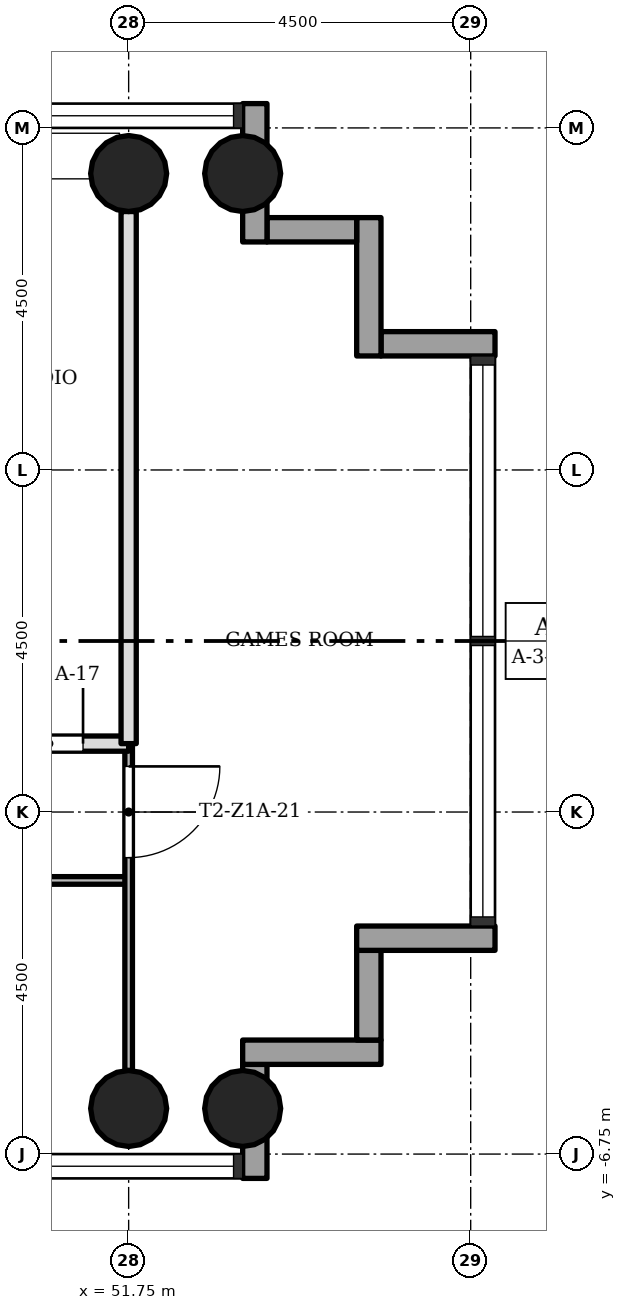
"""IFC4 building model, lengths in metres.
Left out: names, types, materials, properties, quantities, classifications, styles, units other than length and angle.
Written with IfcOpenShell. Run it as: python <this file> out.ifc"""

import sys

from ifc_helpers import new_model, si_unit, direction, frame, frame_2d, origin, origin_2d, place, context, subcontext, project, spatial, rectangle, hollow_circle, extrude, element, fill, save


model = new_model("IFC4")
c1 = context("Model", 3, precision=1e-05, world=origin(), true_north=direction((0.0, 1.0)))
c2 = subcontext(c1, "Body", "Model", "MODEL_VIEW")
j1 = project(units=[si_unit("LENGTHUNIT", "METRE"), si_unit("PLANEANGLEUNIT", "RADIAN")], contexts=[c1])
p1 = place(None, origin())
s1 = spatial("IfcSite", under=j1, at=p1, CompositionType="ELEMENT")
p2 = place(p1, origin())
s2 = spatial("IfcBuilding", under=s1, at=p2, CompositionType="ELEMENT")
p3 = place(p2, frame((0.0, 0.0, 27.9)))
s3 = spatial("IfcBuildingStorey", under=s2, at=p3, CompositionType="ELEMENT", Elevation=27.9)
for number, where, z_axis, x_axis in (
    (1, (51.75, -6.15, 0.0), (0.0, 0.0, 1.0), (1.0, 0.0, 0.0)),
    (2, (51.75, 6.15, 0.0), (0.0, 0.0, 1.0), (1.0, 0.0, 0.0)),
    (3, (53.25, -6.15, 0.0), (0.0, 0.0, 1.0), (1.0, 0.0, 0.0)),
    (4, (53.25, 6.15, 0.0), (0.0, 0.0, 1.0), (1.0, 0.0, 0.0)),
):
    element("IfcColumn", number, at=place(p3, frame(where, z_axis=z_axis, x_axis=x_axis)), inside=s3, PredefinedType="COLUMN", context=c2, shape_type="SweptSolid", body=[
        extrude(hollow_circle(Radius=0.5, WallThickness=0.036, at=origin_2d()), origin(), (0.0, 0.0, 1.0), 3.4),
    ])
p4 = place(p3, frame((53.41, -7.07, -0.3), z_axis=(0.0, 0.0, 1.0), x_axis=(0.0, 1.0, 0.0)))
e5 = element("IfcWall", 5, at=p4, inside=s3, PredefinedType="STANDARD", context=c2, shape_type="SweptSolid", body=[
    extrude(rectangle(XDim=1.5, YDim=0.32, at=frame_2d((0.75, 0.0))), origin(), (0.0, 0.0, 1.0), 3.4),
])
p5 = place(p3, frame((53.25, -5.41, -0.3), z_axis=(0.0, 0.0, 1.0), x_axis=(1.0, 0.0, 0.0)))
e6 = element("IfcWall", 6, at=p5, inside=s3, PredefinedType="STANDARD", context=c2, shape_type="SweptSolid", body=[
    extrude(rectangle(XDim=1.82, YDim=0.32, at=frame_2d((0.91, 0.0))), origin(), (0.0, 0.0, 1.0), 3.4),
])
p6 = place(p3, frame((54.91, -5.25, -0.3), z_axis=(0.0, 0.0, 1.0), x_axis=(0.0, 1.0, 0.0)))
e7 = element("IfcWall", 7, at=p6, inside=s3, PredefinedType="STANDARD", context=c2, shape_type="SweptSolid", body=[
    extrude(rectangle(XDim=1.18, YDim=0.32, at=frame_2d((0.59, 0.0))), origin(), (0.0, 0.0, 1.0), 3.4),
])
p7 = place(p3, frame((54.75, -3.91, -0.3), z_axis=(0.0, 0.0, 1.0), x_axis=(1.0, 0.0, 0.0)))
e8 = element("IfcWall", 8, at=p7, inside=s3, PredefinedType="STANDARD", context=c2, shape_type="SweptSolid", body=[
    extrude(rectangle(XDim=1.82, YDim=0.32, at=frame_2d((0.91, 0.0))), origin(), (0.0, 0.0, 1.0), 3.4),
])
p8 = place(p3, frame((56.57, 3.91, -0.3), z_axis=(0.0, 0.0, 1.0), x_axis=(-1.0, 0.0, 0.0)))
e9 = element("IfcWall", 9, at=p8, inside=s3, PredefinedType="STANDARD", context=c2, shape_type="SweptSolid", body=[
    extrude(rectangle(XDim=1.5, YDim=0.32, at=frame_2d((0.75, 0.0))), origin(), (0.0, 0.0, 1.0), 3.4),
])
p9 = place(p3, frame((54.91, 3.75, -0.3), z_axis=(0.0, 0.0, 1.0), x_axis=(0.0, 1.0, 0.0)))
e10 = element("IfcWall", 10, at=p9, inside=s3, PredefinedType="STANDARD", context=c2, shape_type="SweptSolid", body=[
    extrude(rectangle(XDim=1.82, YDim=0.32, at=frame_2d((0.91, 0.0))), origin(), (0.0, 0.0, 1.0), 3.4),
])
p10 = place(p3, frame((54.75, 5.41, -0.3), z_axis=(0.0, 0.0, 1.0), x_axis=(-1.0, 0.0, 0.0)))
e11 = element("IfcWall", 11, at=p10, inside=s3, PredefinedType="STANDARD", context=c2, shape_type="SweptSolid", body=[
    extrude(rectangle(XDim=1.18, YDim=0.32, at=frame_2d((0.59, 0.0))), origin(), (0.0, 0.0, 1.0), 3.4),
])
p11 = place(p3, frame((53.41, 5.25, -0.3), z_axis=(0.0, 0.0, 1.0), x_axis=(0.0, 1.0, 0.0)))
e12 = element("IfcWall", 12, at=p11, inside=s3, PredefinedType="STANDARD", context=c2, shape_type="SweptSolid", body=[
    extrude(rectangle(XDim=1.82, YDim=0.32, at=frame_2d((0.91, 0.0))), origin(), (0.0, 0.0, 1.0), 3.4),
])
p12 = place(p3, frame((51.75, -3.15, 0.0), z_axis=(0.0, 0.0, 1.0), x_axis=(-1.0, 0.0, 0.0)))
e13 = element("IfcWall", 13, at=p12, inside=s3, PredefinedType="PARTITIONING", context=c2, shape_type="SweptSolid", body=[
    extrude(rectangle(XDim=9.0, YDim=0.1, at=frame_2d((4.5, 0.0))), origin(), (0.0, 0.0, 1.0), 3.0),
])
p13 = place(p12, frame((6.3, 0.0, 0.0)))
e14 = element("IfcOpeningElement", 14, at=p13, cuts=e13, PredefinedType="OPENING", context=c2, shape_type="SweptSolid", body=[
    extrude(rectangle(XDim=0.9, YDim=2.1, at=frame_2d((0.45, 1.05))), frame((0.0, 0.06, 0.0), z_axis=(0.0, -1.0, 0.0), x_axis=(1.0, 0.0, 0.0)), (0.0, 0.0, 1.0), 0.12),
])
p14 = place(p12, frame((1.8, 0.0, 0.0)))
e15 = element("IfcOpeningElement", 15, at=p14, cuts=e13, PredefinedType="OPENING", context=c2, shape_type="SweptSolid", body=[
    extrude(rectangle(XDim=0.9, YDim=2.1, at=frame_2d((0.45, 1.05))), frame((0.0, 0.06, 0.0), z_axis=(0.0, -1.0, 0.0), x_axis=(1.0, 0.0, 0.0)), (0.0, 0.0, 1.0), 0.12),
])
p15 = place(p3, frame((51.75, -1.35, 0.0), z_axis=(0.0, 0.0, 1.0), x_axis=(-1.0, 0.0, 0.0)))
e16 = element("IfcWall", 16, at=p15, inside=s3, PredefinedType="SOLIDWALL", context=c2, shape_type="SweptSolid", body=[
    extrude(rectangle(XDim=4.5, YDim=0.2, at=frame_2d((2.25, 0.0))), origin(), (0.0, 0.0, 1.0), 3.0),
])
p16 = place(p15, frame((0.6, 0.0, 0.0)))
e17 = element("IfcOpeningElement", 17, at=p16, cuts=e16, PredefinedType="OPENING", context=c2, shape_type="SweptSolid", body=[
    extrude(rectangle(XDim=0.9, YDim=2.1, at=frame_2d((0.45, 1.05))), frame((0.0, 0.11, 0.0), z_axis=(0.0, -1.0, 0.0), x_axis=(1.0, 0.0, 0.0)), (0.0, 0.0, 1.0), 0.22),
])
p17 = place(p3, frame((51.75, -5.65, 0.0), z_axis=(0.0, 0.0, 1.0), x_axis=(0.0, 1.0, 0.0)))
e18 = element("IfcWall", 18, at=p17, inside=s3, PredefinedType="PARTITIONING", context=c2, shape_type="SweptSolid", body=[
    extrude(rectangle(XDim=4.3, YDim=0.1, at=frame_2d((2.15, 0.0))), origin(), (0.0, 0.0, 1.0), 3.0),
])
p18 = place(p17, frame((2.8, 0.0, 0.0)))
e19 = element("IfcOpeningElement", 19, at=p18, cuts=e18, PredefinedType="OPENING", context=c2, shape_type="SweptSolid", body=[
    extrude(rectangle(XDim=1.2, YDim=2.1, at=frame_2d((0.6, 1.05))), frame((0.0, 0.06, 0.0), z_axis=(0.0, -1.0, 0.0), x_axis=(1.0, 0.0, 0.0)), (0.0, 0.0, 1.0), 0.12),
])
p19 = place(p3, frame((51.75, -1.35, 0.0), z_axis=(0.0, 0.0, 1.0), x_axis=(0.0, 1.0, 0.0)))
e20 = element("IfcWall", 20, at=p19, inside=s3, PredefinedType="SOLIDWALL", context=c2, shape_type="SweptSolid", body=[
    extrude(rectangle(XDim=7.0, YDim=0.2, at=frame_2d((3.5, 0.0))), origin(), (0.0, 0.0, 1.0), 3.0),
])
p20 = place(p16, origin())
e21 = element("IfcDoor", 21, at=p20, inside=s3, OperationType="SINGLE_SWING_LEFT", PredefinedType="DOOR", context=c2, shape_type="SweptSolid", body=[
    extrude(rectangle(XDim=0.9, YDim=2.1, at=frame_2d((0.45, 1.05))), frame((0.0, 0.025, 0.0), z_axis=(0.0, -1.0, 0.0), x_axis=(1.0, 0.0, 0.0)), (0.0, 0.0, 1.0), 0.05),
])
fill(e17, e21)
p21 = place(p18, origin())
e22 = element("IfcDoor", 22, at=p21, inside=s3, OperationType="SINGLE_SWING_RIGHT", PredefinedType="DOOR", context=c2, shape_type="SweptSolid", body=[
    extrude(rectangle(XDim=1.2, YDim=2.1, at=frame_2d((0.6, 1.05))), frame((0.0, 0.025, 0.0), z_axis=(0.0, -1.0, 0.0), x_axis=(1.0, 0.0, 0.0)), (0.0, 0.0, 1.0), 0.05),
])
fill(e19, e22)
save(model, sys.argv[1])
